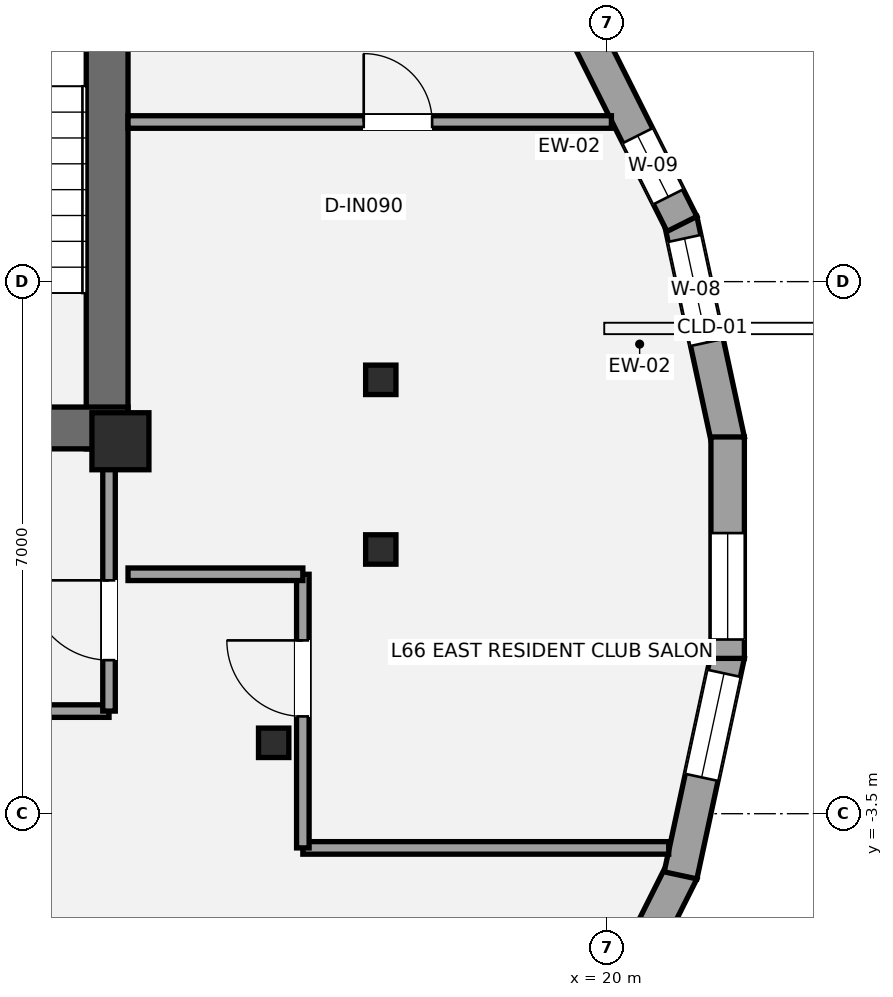
"""IFC4 building model, lengths in metres.
Left out: names, types, materials, properties, quantities, classifications, styles, units other than length and angle.
Written with IfcOpenShell. Run it as: python <this file> out.ifc"""

import sys

from ifc_helpers import new_model, si_unit, direction, frame, frame_2d, origin, origin_2d, place, context, subcontext, project, spatial, rectangle, i_section, extrude, element, fill, save


model = new_model("IFC4")
c1 = context("Model", 3, precision=1e-05, world=origin(), true_north=direction((0.0, 1.0)))
c2 = subcontext(c1, "Body", "Model", "MODEL_VIEW")
j1 = project(units=[si_unit("LENGTHUNIT", "METRE"), si_unit("PLANEANGLEUNIT", "RADIAN")], contexts=[c1])
p1 = place(None, origin())
s1 = spatial("IfcSite", under=j1, at=p1, CompositionType="ELEMENT")
p2 = place(p1, origin())
s2 = spatial("IfcBuilding", under=s1, at=p2, CompositionType="ELEMENT")
p3 = place(p2, frame((0.0, 0.0, 235.2)))
s3 = spatial("IfcBuildingStorey", under=s2, at=p3, CompositionType="ELEMENT", Elevation=235.2)
p4 = place(p3, frame((13.425, 1.3, 0.0), z_axis=(0.0, 0.0, 1.0), x_axis=(0.0, 1.0, 0.0)))
e1 = element("IfcWall", 1, at=p4, inside=s3, PredefinedType="SHEAR", context=c2, shape_type="SweptSolid", body=[
    extrude(rectangle(XDim=8.25, YDim=0.55, at=frame_2d((4.125, 0.0))), origin(), (0.0, 0.0, 1.0), 3.15),
])
p5 = place(p3, frame((13.7, 1.575, 0.0), z_axis=(0.0, 0.0, 1.0), x_axis=(-1.0, 0.0, 0.0)))
e2 = element("IfcWall", 2, at=p5, inside=s3, PredefinedType="SHEAR", context=c2, shape_type="SweptSolid", body=[
    extrude(rectangle(XDim=8.775, YDim=0.55, at=frame_2d((4.387, 0.0))), origin(), (0.0, 0.0, 1.0), 3.15),
])
p6 = place(p5, frame((2.35, 0.0, 0.0)))
e3 = element("IfcOpeningElement", 3, at=p6, cuts=e2, PredefinedType="OPENING", context=c2, shape_type="SweptSolid", body=[
    extrude(rectangle(XDim=1.05, YDim=2.15, at=frame_2d((0.525, 1.075))), frame((0.0, 0.285, 0.0), z_axis=(0.0, -1.0, 0.0), x_axis=(1.0, 0.0, 0.0)), (0.0, 0.0, 1.0), 0.57),
])
p7 = place(p5, frame((4.35, 0.0, 0.0)))
e4 = element("IfcOpeningElement", 4, at=p7, cuts=e2, PredefinedType="OPENING", context=c2, shape_type="SweptSolid", body=[
    extrude(rectangle(XDim=1.1, YDim=2.2, at=frame_2d((0.55, 1.1))), frame((0.0, 0.285, 0.0), z_axis=(0.0, -1.0, 0.0), x_axis=(1.0, 0.0, 0.0)), (0.0, 0.0, 1.0), 0.57),
])
p8 = place(p3, frame((13.6, 1.4, 0.0), z_axis=(0.0, 0.0, 1.0), x_axis=(1.0, 0.0, 0.0)))
e5 = element("IfcColumn", 5, at=p8, inside=s3, PredefinedType="PILASTER", context=c2, shape_type="SweptSolid", body=[
    extrude(rectangle(XDim=0.75, YDim=0.75, at=origin_2d()), origin(), (0.0, 0.0, 1.0), 3.15),
])
for number, where, z_axis, x_axis in (
    (6, (17.026, 2.208, 0.0), (0.0, 0.0, 1.0), (1.0, 0.0, 0.0)),
    (7, (15.616, -2.567, 0.0), (0.0, 0.0, 1.0), (1.0, 0.0, 0.0)),
    (8, (17.026, -0.024, 0.0), (0.0, 0.0, 1.0), (1.0, 0.0, 0.0)),
):
    element("IfcColumn", number, at=place(p3, frame(where, z_axis=z_axis, x_axis=x_axis)), inside=s3, PredefinedType="COLUMN", context=c2, shape_type="SweptSolid", body=[
        extrude(i_section(OverallWidth=0.399, OverallDepth=0.387, WebThickness=0.021, FlangeThickness=0.033, at=origin_2d()), origin(), (0.0, 0.0, 1.0), 3.15),
    ])
p9 = place(p3, frame((20.969, 4.311, 0.0), z_axis=(0.0, 0.0, 1.0), x_axis=(0.210540350534, -0.977585168053, 0.0)))
e9 = element("IfcWall", 9, at=p9, inside=s3, PredefinedType="STANDARD", context=c2, shape_type="SweptSolid", body=[
    extrude(rectangle(XDim=2.967, YDim=0.44, at=frame_2d((1.484, 0.0))), origin(), (0.0, 0.0, 1.0), 2.336),
])
p10 = place(p9, frame((0.249, 0.0, 0.55)))
e10 = element("IfcOpeningElement", 10, at=p10, cuts=e9, PredefinedType="OPENING", context=c2, shape_type="SweptSolid", body=[
    extrude(rectangle(XDim=1.4, YDim=1.55, at=frame_2d((0.7, 0.775))), frame((0.0, 0.23, 0.0), z_axis=(0.0, -1.0, 0.0), x_axis=(1.0, 0.0, 0.0)), (0.0, 0.0, 1.0), 0.46),
])
p11 = place(p3, frame((19.578, 7.069, 0.0), z_axis=(0.0, 0.0, 1.0), x_axis=(0.448424724145, -0.893820601002, 0.0)))
e11 = element("IfcWall", 11, at=p11, inside=s3, PredefinedType="STANDARD", context=c2, shape_type="SweptSolid", body=[
    extrude(rectangle(XDim=3.144, YDim=0.44, at=frame_2d((1.572, 0.0))), origin(), (0.0, 0.0, 1.0), 2.336),
])
p12 = place(p11, frame((1.844, 0.0, 0.58)))
e12 = element("IfcOpeningElement", 12, at=p12, cuts=e11, PredefinedType="OPENING", context=c2, shape_type="SweptSolid", body=[
    extrude(rectangle(XDim=0.9, YDim=1.35, at=frame_2d((0.45, 0.675))), frame((0.0, 0.23, 0.0), z_axis=(0.0, -1.0, 0.0), x_axis=(1.0, 0.0, 0.0)), (0.0, 0.0, 1.0), 0.46),
])
p13 = place(p3, frame((20.988, -4.259, 0.0), z_axis=(0.0, 0.0, 1.0), x_axis=(-0.448424724145, -0.893820601002, 0.0)))
e13 = element("IfcWall", 13, at=p13, inside=s3, PredefinedType="STANDARD", context=c2, shape_type="SweptSolid", body=[
    extrude(rectangle(XDim=3.144, YDim=0.44, at=frame_2d((1.572, 0.0))), origin(), (0.0, 0.0, 1.0), 2.336),
])
p14 = place(p13, frame((1.296, 0.0, 0.58)))
e14 = element("IfcOpeningElement", 14, at=p14, cuts=e13, PredefinedType="OPENING", context=c2, shape_type="SweptSolid", body=[
    extrude(rectangle(XDim=0.9, YDim=1.35, at=frame_2d((0.45, 0.675))), frame((0.0, 0.23, 0.0), z_axis=(0.0, -1.0, 0.0), x_axis=(1.0, 0.0, 0.0)), (0.0, 0.0, 1.0), 0.46),
])
p15 = place(p3, frame((21.594, -1.41, 0.0), z_axis=(0.0, 0.0, 1.0), x_axis=(-0.210540350534, -0.977585168053, 0.0)))
e15 = element("IfcWall", 15, at=p15, inside=s3, PredefinedType="STANDARD", context=c2, shape_type="SweptSolid", body=[
    extrude(rectangle(XDim=2.967, YDim=0.44, at=frame_2d((1.484, 0.0))), origin(), (0.0, 0.0, 1.0), 2.336),
])
p16 = place(p15, frame((0.249, 0.0, 0.55)))
e16 = element("IfcOpeningElement", 16, at=p16, cuts=e15, PredefinedType="OPENING", context=c2, shape_type="SweptSolid", body=[
    extrude(rectangle(XDim=1.4, YDim=1.55, at=frame_2d((0.7, 0.775))), frame((0.0, 0.23, 0.0), z_axis=(0.0, -1.0, 0.0), x_axis=(1.0, 0.0, 0.0)), (0.0, 0.0, 1.0), 0.46),
])
p17 = place(p3, frame((21.589, 1.457, 0.0), z_axis=(0.0, 0.0, 1.0), x_axis=(0.0, -1.0, 0.0)))
e17 = element("IfcWall", 17, at=p17, inside=s3, PredefinedType="STANDARD", context=c2, shape_type="SweptSolid", body=[
    extrude(rectangle(XDim=2.913, YDim=0.44, at=frame_2d((1.457, 0.0))), origin(), (0.0, 0.0, 1.0), 2.336),
])
p18 = place(p17, frame((1.265, 0.0, 0.58)))
e18 = element("IfcOpeningElement", 18, at=p18, cuts=e17, PredefinedType="OPENING", context=c2, shape_type="SweptSolid", body=[
    extrude(rectangle(XDim=1.4, YDim=1.55, at=frame_2d((0.7, 0.775))), frame((0.0, 0.23, 0.0), z_axis=(0.0, -1.0, 0.0), x_axis=(1.0, 0.0, 0.0)), (0.0, 0.0, 1.0), 0.46),
])
p19 = place(p3, frame((7.2, -2.15, 0.0), z_axis=(0.0, 0.0, 1.0), x_axis=(1.0, 0.0, 0.0)))
e19 = element("IfcWall", 19, at=p19, inside=s3, PredefinedType="PARTITIONING", context=c2, shape_type="SweptSolid", body=[
    extrude(rectangle(XDim=6.25, YDim=0.165, at=frame_2d((3.125, 0.0))), origin(), (0.0, 0.0, 1.0), 2.97),
])
p20 = place(p3, frame((13.45, -2.15, 0.0), z_axis=(0.0, 0.0, 1.0), x_axis=(0.0, 1.0, 0.0)))
e20 = element("IfcWall", 20, at=p20, inside=s3, PredefinedType="PARTITIONING", context=c2, shape_type="SweptSolid", body=[
    extrude(rectangle(XDim=3.5, YDim=0.165, at=frame_2d((1.75, 0.0))), origin(), (0.0, 0.0, 1.0), 2.423),
])
p21 = place(p20, frame((0.67, 0.0, 0.0)))
e21 = element("IfcOpeningElement", 21, at=p21, cuts=e20, PredefinedType="OPENING", context=c2, shape_type="SweptSolid", body=[
    extrude(rectangle(XDim=1.05, YDim=2.15, at=frame_2d((0.525, 1.075))), frame((0.0, 0.093, 0.0), z_axis=(0.0, -1.0, 0.0), x_axis=(1.0, 0.0, 0.0)), (0.0, 0.0, 1.0), 0.185),
])
p22 = place(p3, frame((16.0, -3.95, 0.0), z_axis=(0.0, 0.0, 1.0), x_axis=(1.0, 0.0, 0.0)))
e22 = element("IfcWall", 22, at=p22, inside=s3, PredefinedType="PARTITIONING", context=c2, shape_type="SweptSolid", body=[
    extrude(rectangle(XDim=4.814, YDim=0.165, at=frame_2d((2.407, 0.0))), origin(), (0.0, 0.0, 1.0), 2.423),
])
p23 = place(p3, frame((16.0, -3.95, 0.0), z_axis=(0.0, 0.0, 1.0), x_axis=(0.0, 1.0, 0.0)))
e23 = element("IfcWall", 23, at=p23, inside=s3, PredefinedType="PARTITIONING", context=c2, shape_type="SweptSolid", body=[
    extrude(rectangle(XDim=3.6, YDim=0.165, at=frame_2d((1.8, 0.0))), origin(), (0.0, 0.0, 1.0), 2.357),
])
p24 = place(p23, frame((1.73, 0.0, 0.0)))
e24 = element("IfcOpeningElement", 24, at=p24, cuts=e23, PredefinedType="OPENING", context=c2, shape_type="SweptSolid", body=[
    extrude(rectangle(XDim=1.0, YDim=2.15, at=frame_2d((0.5, 1.075))), frame((0.0, 0.093, 0.0), z_axis=(0.0, -1.0, 0.0), x_axis=(1.0, 0.0, 0.0)), (0.0, 0.0, 1.0), 0.185),
])
p25 = place(p3, frame((13.7, -0.35, 0.0), z_axis=(0.0, 0.0, 1.0), x_axis=(1.0, 0.0, 0.0)))
e25 = element("IfcWall", 25, at=p25, inside=s3, PredefinedType="PARTITIONING", context=c2, shape_type="SweptSolid", body=[
    extrude(rectangle(XDim=2.3, YDim=0.165, at=frame_2d((1.15, 0.0))), origin(), (0.0, 0.0, 1.0), 2.423),
])
p26 = place(p3, frame((13.7, 5.6, 0.0), z_axis=(0.0, 0.0, 1.0), x_axis=(1.0, 0.0, 0.0)))
e26 = element("IfcWall", 26, at=p26, inside=s3, PredefinedType="PARTITIONING", context=c2, shape_type="SweptSolid", body=[
    extrude(rectangle(XDim=6.36, YDim=0.165, at=frame_2d((3.18, 0.0))), origin(), (0.0, 0.0, 1.0), 2.423),
])
p27 = place(p26, frame((3.101, 0.0, 0.0)))
e27 = element("IfcOpeningElement", 27, at=p27, cuts=e26, PredefinedType="OPENING", context=c2, shape_type="SweptSolid", body=[
    extrude(rectangle(XDim=0.9, YDim=2.1, at=frame_2d((0.45, 1.05))), frame((0.0, 0.093, 0.0), z_axis=(0.0, -1.0, 0.0), x_axis=(1.0, 0.0, 0.0)), (0.0, 0.0, 1.0), 0.185),
])
p28 = place(p10, origin())
e28 = element("IfcWindow", 28, at=p28, inside=s3, PartitioningType="SINGLE_PANEL", PredefinedType="WINDOW", context=c2, shape_type="SweptSolid", body=[
    extrude(rectangle(XDim=1.4, YDim=1.55, at=frame_2d((0.7, 0.775))), frame((0.0, -0.01, 0.0), z_axis=(0.0, -1.0, 0.0), x_axis=(1.0, 0.0, 0.0)), (0.0, 0.0, 1.0), 0.06),
])
fill(e10, e28)
p29 = place(p12, origin())
e29 = element("IfcWindow", 29, at=p29, inside=s3, PartitioningType="SINGLE_PANEL", PredefinedType="WINDOW", context=c2, shape_type="SweptSolid", body=[
    extrude(rectangle(XDim=0.9, YDim=1.35, at=frame_2d((0.45, 0.675))), frame((0.0, -0.01, 0.0), z_axis=(0.0, -1.0, 0.0), x_axis=(1.0, 0.0, 0.0)), (0.0, 0.0, 1.0), 0.06),
])
fill(e12, e29)
p30 = place(p16, origin())
e30 = element("IfcWindow", 30, at=p30, inside=s3, PartitioningType="SINGLE_PANEL", PredefinedType="WINDOW", context=c2, shape_type="SweptSolid", body=[
    extrude(rectangle(XDim=1.4, YDim=1.55, at=frame_2d((0.7, 0.775))), frame((0.0, -0.01, 0.0), z_axis=(0.0, -1.0, 0.0), x_axis=(1.0, 0.0, 0.0)), (0.0, 0.0, 1.0), 0.06),
])
fill(e16, e30)
p31 = place(p18, origin())
e31 = element("IfcWindow", 31, at=p31, inside=s3, PartitioningType="SINGLE_PANEL", PredefinedType="WINDOW", context=c2, shape_type="SweptSolid", body=[
    extrude(rectangle(XDim=1.4, YDim=1.55, at=frame_2d((0.7, 0.775))), frame((0.0, -0.01, 0.0), z_axis=(0.0, -1.0, 0.0), x_axis=(1.0, 0.0, 0.0)), (0.0, 0.0, 1.0), 0.06),
])
fill(e18, e31)
p32 = place(p21, origin())
e32 = element("IfcDoor", 32, at=p32, inside=s3, OperationType="SINGLE_SWING_RIGHT", PredefinedType="DOOR", context=c2, shape_type="SweptSolid", body=[
    extrude(rectangle(XDim=1.05, YDim=2.15, at=frame_2d((0.525, 1.075))), frame((0.0, 0.025, 0.0), z_axis=(0.0, -1.0, 0.0), x_axis=(1.0, 0.0, 0.0)), (0.0, 0.0, 1.0), 0.05),
])
fill(e21, e32)
p33 = place(p24, origin())
e33 = element("IfcDoor", 33, at=p33, inside=s3, OperationType="SINGLE_SWING_RIGHT", PredefinedType="DOOR", context=c2, shape_type="SweptSolid", body=[
    extrude(rectangle(XDim=1.0, YDim=2.15, at=frame_2d((0.5, 1.075))), frame((0.0, 0.025, 0.0), z_axis=(0.0, -1.0, 0.0), x_axis=(1.0, 0.0, 0.0)), (0.0, 0.0, 1.0), 0.05),
])
fill(e24, e33)
p34 = place(p27, origin())
e34 = element("IfcDoor", 34, at=p34, inside=s3, OperationType="SINGLE_SWING_LEFT", PredefinedType="DOOR", context=c2, shape_type="SweptSolid", body=[
    extrude(rectangle(XDim=0.9, YDim=2.1, at=frame_2d((0.45, 1.05))), frame((0.0, 0.025, 0.0), z_axis=(0.0, -1.0, 0.0), x_axis=(1.0, 0.0, 0.0)), (0.0, 0.0, 1.0), 0.05),
])
fill(e27, e34)
save(model, sys.argv[1])
